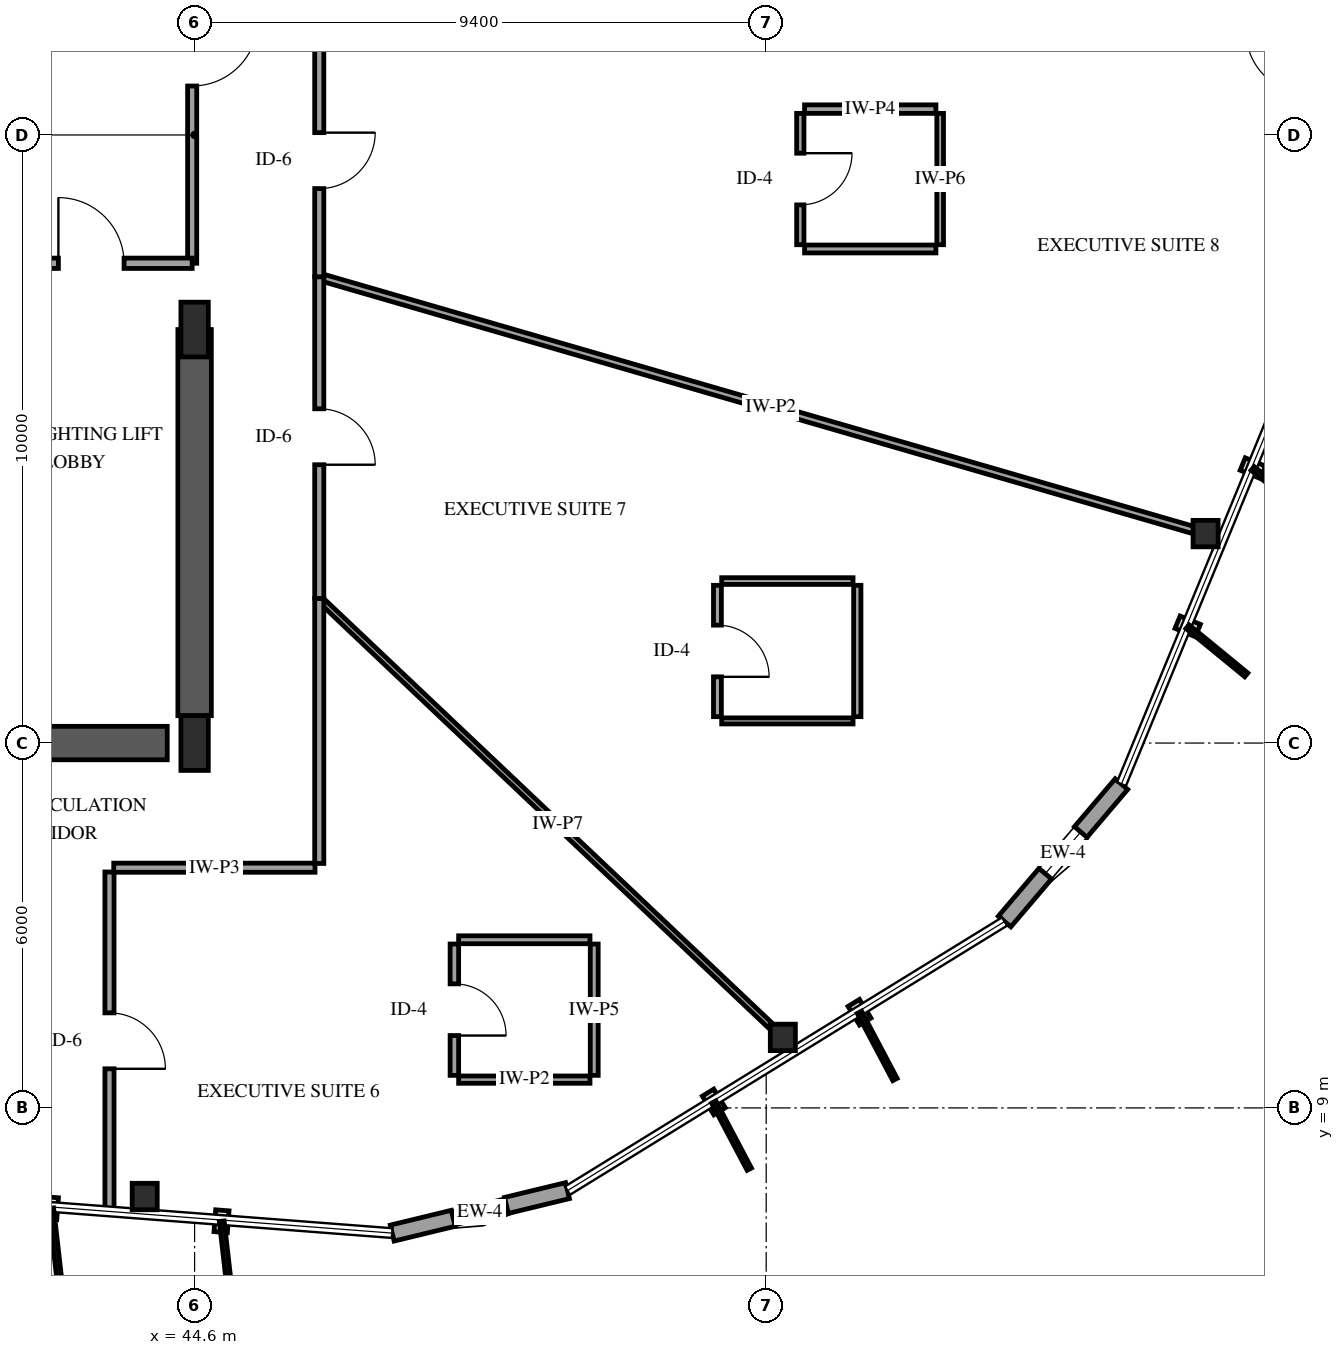
"""IFC4 building model, lengths in metres.
Left out: names, types, materials, properties, quantities, classifications, styles, units other than length and angle.
Written with IfcOpenShell. Run it as: python <this file> out.ifc"""

import sys

from ifc_helpers import new_model, si_unit, direction, frame, frame_2d, origin, origin_2d, place, context, subcontext, project, spatial, rectangle, i_section, extrude, element, fill, save


model = new_model("IFC4")
c1 = context("Model", 3, precision=1e-05, world=origin(), true_north=direction((0.0, 1.0)))
c2 = subcontext(c1, "Body", "Model", "MODEL_VIEW")
j1 = project(units=[si_unit("LENGTHUNIT", "METRE"), si_unit("PLANEANGLEUNIT", "RADIAN")], contexts=[c1])
p1 = place(None, origin())
s1 = spatial("IfcSite", under=j1, at=p1, CompositionType="ELEMENT")
p2 = place(p1, origin())
s2 = spatial("IfcBuilding", under=s1, at=p2, CompositionType="ELEMENT")
p3 = place(p2, frame((0.0, 0.0, 149.8)))
s3 = spatial("IfcBuildingStorey", under=s2, at=p3, CompositionType="ELEMENT", Elevation=149.8)
p4 = place(p3, frame((41.3, 15.0, 0.0), z_axis=(0.0, 0.0, 1.0), x_axis=(1.0, 0.0, 0.0)))
e1 = element("IfcWall", 1, at=p4, inside=s3, PredefinedType="SHEAR", context=c2, shape_type="SweptSolid", body=[
    extrude(rectangle(XDim=2.85, YDim=0.55, at=frame_2d((1.425, 0.0))), origin(), (0.0, 0.0, 1.0), 3.6),
])
p5 = place(p3, frame((44.6, 15.45, 0.0), z_axis=(0.0, 0.0, 1.0), x_axis=(0.0, 1.0, 0.0)))
e2 = element("IfcWall", 2, at=p5, inside=s3, PredefinedType="SHEAR", context=c2, shape_type="SweptSolid", body=[
    extrude(rectangle(XDim=6.35, YDim=0.55, at=frame_2d((3.175, 0.0))), origin(), (0.0, 0.0, 1.0), 3.6),
])
for number, where, z_axis, x_axis in (
    (3, (44.6, 15.0, 0.0), (0.0, 0.0, 1.0), (1.0, 0.0, 0.0)),
    (4, (44.6, 21.8, 0.0), (0.0, 0.0, 1.0), (1.0, 0.0, 0.0)),
):
    element("IfcColumn", number, at=place(p3, frame(where, z_axis=z_axis, x_axis=x_axis)), inside=s3, PredefinedType="PILASTER", context=c2, shape_type="SweptSolid", body=[
        extrude(rectangle(XDim=0.45, YDim=0.9, at=origin_2d()), origin(), (0.0, 0.0, 1.0), 3.6),
    ])
for number, where, z_axis, x_axis in (
    (5, (43.779, 7.542, 0.0), (0.0, 0.0, 1.0), (1.0, 0.0, 0.0)),
    (6, (54.274, 10.159, 0.0), (0.0, 0.0, 1.0), (1.0, 0.0, 0.0)),
    (7, (61.226, 18.444, 0.0), (0.0, 0.0, 1.0), (1.0, 0.0, 0.0)),
):
    element("IfcColumn", number, at=place(p3, frame(where, z_axis=z_axis, x_axis=x_axis)), inside=s3, PredefinedType="COLUMN", context=c2, shape_type="SweptSolid", body=[
        extrude(i_section(OverallWidth=0.412, OverallDepth=0.435, WebThickness=0.036, FlangeThickness=0.057, FilletRadius=0.038, at=origin_2d()), origin(), (0.0, 0.0, 1.0), 3.6),
    ])
p6 = place(p3, frame((47.849, 6.941, 0.0), z_axis=(0.0, 0.0, 1.0), x_axis=(0.971864950353, 0.235538782955, 0.0)))
e8 = element("IfcWall", 8, at=p6, inside=s3, PredefinedType="SOLIDWALL", context=c2, shape_type="SweptSolid", body=[
    extrude(rectangle(XDim=2.967, YDim=0.27, at=frame_2d((1.483, 0.0))), origin(), (0.0, 0.0, 1.0), 2.679),
])
p7 = place(p6, frame((1.033, 0.0, 0.75)))
e9 = element("IfcOpeningElement", 9, at=p7, cuts=e8, PredefinedType="OPENING", context=c2, shape_type="SweptSolid", body=[
    extrude(rectangle(XDim=0.9, YDim=1.5, at=frame_2d((0.45, 0.75))), frame((0.0, 0.145, 0.0), z_axis=(0.0, -1.0, 0.0), x_axis=(1.0, 0.0, 0.0)), (0.0, 0.0, 1.0), 0.29),
])
p8 = place(p3, frame((57.92, 12.065, 0.0), z_axis=(0.0, 0.0, 1.0), x_axis=(0.647858622498, 0.761760595762, 0.0)))
e10 = element("IfcWall", 10, at=p8, inside=s3, PredefinedType="SOLIDWALL", context=c2, shape_type="SweptSolid", body=[
    extrude(rectangle(XDim=2.967, YDim=0.27, at=frame_2d((1.483, 0.0))), origin(), (0.0, 0.0, 1.0), 2.679),
])
p9 = place(p8, frame((1.033, 0.0, 0.75)))
e11 = element("IfcOpeningElement", 11, at=p9, cuts=e10, PredefinedType="OPENING", context=c2, shape_type="SweptSolid", body=[
    extrude(rectangle(XDim=0.9, YDim=1.5, at=frame_2d((0.45, 0.75))), frame((0.0, 0.145, 0.0), z_axis=(0.0, -1.0, 0.0), x_axis=(1.0, 0.0, 0.0)), (0.0, 0.0, 1.0), 0.29),
])
p10 = place(p3, frame((63.282, 25.087, 0.0), z_axis=(0.0, 0.0, 1.0), x_axis=(-0.235484947951, 0.971877996092, 0.0)))
e12 = element("IfcWall", 12, at=p10, inside=s3, PredefinedType="SOLIDWALL", context=c2, shape_type="SweptSolid", body=[
    extrude(rectangle(XDim=8.44, YDim=0.25, at=frame_2d((4.22, 0.0))), origin(), (0.0, 0.0, 1.0), 2.679),
])
p11 = place(p10, frame((0.65, 0.0, 0.0)))
e13 = element("IfcOpeningElement", 13, at=p11, cuts=e12, PredefinedType="OPENING", context=c2, shape_type="SweptSolid", body=[
    extrude(rectangle(XDim=1.0, YDim=2.15, at=frame_2d((0.5, 1.075))), frame((0.0, 0.135, 0.0), z_axis=(0.0, -1.0, 0.0), x_axis=(1.0, 0.0, 0.0)), (0.0, 0.0, 1.0), 0.27),
])
p12 = place(p10, frame((2.29, 0.0, 0.72)))
e14 = element("IfcOpeningElement", 14, at=p12, cuts=e12, PredefinedType="OPENING", context=c2, shape_type="SweptSolid", body=[
    extrude(rectangle(XDim=1.35, YDim=1.65, at=frame_2d((0.675, 0.825))), frame((0.0, 0.135, 0.0), z_axis=(0.0, -1.0, 0.0), x_axis=(1.0, 0.0, 0.0)), (0.0, 0.0, 1.0), 0.27),
])
p13 = place(p3, frame((46.65, 22.668, 0.0), z_axis=(0.0, 0.0, 1.0), x_axis=(0.960498108687, -0.278286512804, 0.0)))
e15 = element("IfcWall", 15, at=p13, inside=s3, PredefinedType="PARTITIONING", context=c2, shape_type="SweptSolid", body=[
    extrude(rectangle(XDim=15.466, YDim=0.12, at=frame_2d((7.733, 0.0))), origin(), (0.0, 0.0, 1.0), 3.3),
])
p14 = place(p3, frame((46.65, 17.377, 0.0), z_axis=(0.0, 0.0, 1.0), x_axis=(0.726208125351, -0.687474914942, 0.0)))
e16 = element("IfcWall", 16, at=p14, inside=s3, PredefinedType="PARTITIONING", context=c2, shape_type="SweptSolid", body=[
    extrude(rectangle(XDim=10.797, YDim=0.1, at=frame_2d((5.399, 0.0))), origin(), (0.0, 0.0, 1.0), 2.595),
])
p15 = place(p3, frame((44.56, 29.8, 0.0), z_axis=(0.0, 0.0, 1.0), x_axis=(0.0, -1.0, 0.0)))
e17 = element("IfcWall", 17, at=p15, inside=s3, PredefinedType="PARTITIONING", context=c2, shape_type="SweptSolid", body=[
    extrude(rectangle(XDim=6.91, YDim=0.15, at=frame_2d((3.455, 0.0))), origin(), (0.0, 0.0, 1.0), 2.34),
])
p16 = place(p15, frame((2.915, 0.0, 0.0)))
e18 = element("IfcOpeningElement", 18, at=p16, cuts=e17, PredefinedType="OPENING", context=c2, shape_type="SweptSolid", body=[
    extrude(rectangle(XDim=1.08, YDim=2.15, at=frame_2d((0.54, 1.075))), frame((0.0, 0.085, 0.0), z_axis=(0.0, -1.0, 0.0), x_axis=(1.0, 0.0, 0.0)), (0.0, 0.0, 1.0), 0.17),
])
p17 = place(p3, frame((43.2, 12.88, 0.0), z_axis=(0.0, 0.0, 1.0), x_axis=(0.0, -1.0, 0.0)))
e19 = element("IfcWall", 19, at=p17, inside=s3, PredefinedType="PARTITIONING", context=c2, shape_type="SweptSolid", body=[
    extrude(rectangle(XDim=5.583, YDim=0.15, at=frame_2d((2.792, 0.0))), origin(), (0.0, 0.0, 1.0), 2.595),
])
p18 = place(p17, frame((2.317, 0.0, 0.0)))
e20 = element("IfcOpeningElement", 20, at=p18, cuts=e19, PredefinedType="OPENING", context=c2, shape_type="SweptSolid", body=[
    extrude(rectangle(XDim=0.92, YDim=2.12, at=frame_2d((0.46, 1.06))), frame((0.0, 0.085, 0.0), z_axis=(0.0, -1.0, 0.0), x_axis=(1.0, 0.0, 0.0)), (0.0, 0.0, 1.0), 0.17),
])
p19 = place(p3, frame((46.65, 22.668, 0.0), z_axis=(0.0, 0.0, 1.0), x_axis=(0.0, -1.0, 0.0)))
e21 = element("IfcWall", 21, at=p19, inside=s3, PredefinedType="PARTITIONING", context=c2, shape_type="SweptSolid", body=[
    extrude(rectangle(XDim=5.291, YDim=0.15, at=frame_2d((2.646, 0.0))), origin(), (0.0, 0.0, 1.0), 3.3),
])
p20 = place(p19, frame((2.171, 0.0, 0.0)))
e22 = element("IfcOpeningElement", 22, at=p20, cuts=e21, PredefinedType="OPENING", context=c2, shape_type="SweptSolid", body=[
    extrude(rectangle(XDim=0.92, YDim=2.12, at=frame_2d((0.46, 1.06))), frame((0.0, 0.085, 0.0), z_axis=(0.0, -1.0, 0.0), x_axis=(1.0, 0.0, 0.0)), (0.0, 0.0, 1.0), 0.17),
])
p21 = place(p3, frame((46.65, 17.377, 0.0), z_axis=(0.0, 0.0, 1.0), x_axis=(0.0, -1.0, 0.0)))
e23 = element("IfcWall", 23, at=p21, inside=s3, PredefinedType="PARTITIONING", context=c2, shape_type="SweptSolid", body=[
    extrude(rectangle(XDim=4.357, YDim=0.15, at=frame_2d((2.178, 0.0))), origin(), (0.0, 0.0, 1.0), 3.3),
])
p22 = place(p3, frame((46.65, 26.458, 0.0), z_axis=(0.0, 0.0, 1.0), x_axis=(0.0, -1.0, 0.0)))
e24 = element("IfcWall", 24, at=p22, inside=s3, PredefinedType="PARTITIONING", context=c2, shape_type="SweptSolid", body=[
    extrude(rectangle(XDim=3.79, YDim=0.15, at=frame_2d((1.895, 0.0))), origin(), (0.0, 0.0, 1.0), 3.3),
])
p23 = place(p22, frame((1.42, 0.0, 0.0)))
e25 = element("IfcOpeningElement", 25, at=p23, cuts=e24, PredefinedType="OPENING", context=c2, shape_type="SweptSolid", body=[
    extrude(rectangle(XDim=0.92, YDim=2.12, at=frame_2d((0.46, 1.06))), frame((0.0, 0.085, 0.0), z_axis=(0.0, -1.0, 0.0), x_axis=(1.0, 0.0, 0.0)), (0.0, 0.0, 1.0), 0.17),
])
p24 = place(p3, frame((41.24, 22.89, 0.0), z_axis=(0.0, 0.0, 1.0), x_axis=(1.0, 0.0, 0.0)))
e26 = element("IfcWall", 26, at=p24, inside=s3, PredefinedType="PARTITIONING", context=c2, shape_type="SweptSolid", body=[
    extrude(rectangle(XDim=3.32, YDim=0.17, at=frame_2d((1.66, 0.0))), origin(), (0.0, 0.0, 1.0), 3.3),
])
p25 = place(p24, frame((1.12, 0.0, 0.0)))
e27 = element("IfcOpeningElement", 27, at=p25, cuts=e26, PredefinedType="OPENING", context=c2, shape_type="SweptSolid", body=[
    extrude(rectangle(XDim=1.08, YDim=2.15, at=frame_2d((0.54, 1.075))), frame((0.0, 0.095, 0.0), z_axis=(0.0, -1.0, 0.0), x_axis=(1.0, 0.0, 0.0)), (0.0, 0.0, 1.0), 0.19),
])
p26 = place(p3, frame((46.58, 12.95, 0.0), z_axis=(0.0, 0.0, 1.0), x_axis=(-1.0, 0.0, 0.0)))
e28 = element("IfcWall", 28, at=p26, inside=s3, PredefinedType="PARTITIONING", context=c2, shape_type="SweptSolid", body=[
    extrude(rectangle(XDim=3.31, YDim=0.15, at=frame_2d((1.655, 0.0))), origin(), (0.0, 0.0, 1.0), 3.3),
])
p27 = place(p3, frame((53.198, 17.594, 0.0), z_axis=(0.0, 0.0, 1.0), x_axis=(0.0, -1.0, 0.0)))
e29 = element("IfcWall", 29, at=p27, inside=s3, PredefinedType="PARTITIONING", context=c2, shape_type="SweptSolid", body=[
    extrude(rectangle(XDim=2.16, YDim=0.13, at=frame_2d((1.08, 0.0))), origin(), (0.0, 0.0, 1.0), 3.3),
])
p28 = place(p27, frame((0.655, 0.0, 0.0)))
e30 = element("IfcOpeningElement", 30, at=p28, cuts=e29, PredefinedType="OPENING", context=c2, shape_type="SweptSolid", body=[
    extrude(rectangle(XDim=0.85, YDim=2.1, at=frame_2d((0.425, 1.05))), frame((0.0, 0.075, 0.0), z_axis=(0.0, -1.0, 0.0), x_axis=(1.0, 0.0, 0.0)), (0.0, 0.0, 1.0), 0.15),
])
p29 = place(p3, frame((55.498, 15.434, 0.0), z_axis=(0.0, 0.0, 1.0), x_axis=(0.0, 1.0, 0.0)))
e31 = element("IfcWall", 31, at=p29, inside=s3, PredefinedType="PARTITIONING", context=c2, shape_type="SweptSolid", body=[
    extrude(rectangle(XDim=2.16, YDim=0.12, at=frame_2d((1.08, 0.0))), origin(), (0.0, 0.0, 1.0), 3.3),
])
p30 = place(p3, frame((48.872, 11.695, 0.0), z_axis=(0.0, 0.0, 1.0), x_axis=(0.0, -1.0, 0.0)))
e32 = element("IfcWall", 32, at=p30, inside=s3, PredefinedType="PARTITIONING", context=c2, shape_type="SweptSolid", body=[
    extrude(rectangle(XDim=2.16, YDim=0.14, at=frame_2d((1.08, 0.0))), origin(), (0.0, 0.0, 1.0), 3.3),
])
p31 = place(p30, frame((0.655, 0.0, 0.0)))
e33 = element("IfcOpeningElement", 33, at=p31, cuts=e32, PredefinedType="OPENING", context=c2, shape_type="SweptSolid", body=[
    extrude(rectangle(XDim=0.85, YDim=2.1, at=frame_2d((0.425, 1.05))), frame((0.0, 0.08, 0.0), z_axis=(0.0, -1.0, 0.0), x_axis=(1.0, 0.0, 0.0)), (0.0, 0.0, 1.0), 0.16),
])
p32 = place(p3, frame((51.172, 9.535, 0.0), z_axis=(0.0, 0.0, 1.0), x_axis=(0.0, 1.0, 0.0)))
e34 = element("IfcWall", 34, at=p32, inside=s3, PredefinedType="PARTITIONING", context=c2, shape_type="SweptSolid", body=[
    extrude(rectangle(XDim=2.16, YDim=0.13, at=frame_2d((1.08, 0.0))), origin(), (0.0, 0.0, 1.0), 3.3),
])
p33 = place(p3, frame((54.561, 25.355, 0.0), z_axis=(0.0, 0.0, 1.0), x_axis=(0.0, -1.0, 0.0)))
e35 = element("IfcWall", 35, at=p33, inside=s3, PredefinedType="PARTITIONING", context=c2, shape_type="SweptSolid", body=[
    extrude(rectangle(XDim=2.16, YDim=0.12, at=frame_2d((1.08, 0.0))), origin(), (0.0, 0.0, 1.0), 3.3),
])
p34 = place(p33, frame((0.655, 0.0, 0.0)))
e36 = element("IfcOpeningElement", 36, at=p34, cuts=e35, PredefinedType="OPENING", context=c2, shape_type="SweptSolid", body=[
    extrude(rectangle(XDim=0.85, YDim=2.1, at=frame_2d((0.425, 1.05))), frame((0.0, 0.07, 0.0), z_axis=(0.0, -1.0, 0.0), x_axis=(1.0, 0.0, 0.0)), (0.0, 0.0, 1.0), 0.14),
])
p35 = place(p3, frame((56.861, 23.195, 0.0), z_axis=(0.0, 0.0, 1.0), x_axis=(0.0, 1.0, 0.0)))
e37 = element("IfcWall", 37, at=p35, inside=s3, PredefinedType="PARTITIONING", context=c2, shape_type="SweptSolid", body=[
    extrude(rectangle(XDim=2.16, YDim=0.11, at=frame_2d((1.08, 0.0))), origin(), (0.0, 0.0, 1.0), 3.3),
])
p36 = place(p3, frame((51.102, 11.765, 0.0), z_axis=(0.0, 0.0, 1.0), x_axis=(-1.0, 0.0, 0.0)))
e38 = element("IfcWall", 38, at=p36, inside=s3, PredefinedType="PARTITIONING", context=c2, shape_type="SweptSolid", body=[
    extrude(rectangle(XDim=2.16, YDim=0.13, at=frame_2d((1.08, 0.0))), origin(), (0.0, 0.0, 1.0), 3.3),
])
p37 = place(p3, frame((48.942, 9.465, 0.0), z_axis=(0.0, 0.0, 1.0), x_axis=(1.0, 0.0, 0.0)))
e39 = element("IfcWall", 39, at=p37, inside=s3, PredefinedType="PARTITIONING", context=c2, shape_type="SweptSolid", body=[
    extrude(rectangle(XDim=2.16, YDim=0.12, at=frame_2d((1.08, 0.0))), origin(), (0.0, 0.0, 1.0), 2.511),
])
p38 = place(p3, frame((55.428, 17.664, 0.0), z_axis=(0.0, 0.0, 1.0), x_axis=(-1.0, 0.0, 0.0)))
e40 = element("IfcWall", 40, at=p38, inside=s3, PredefinedType="PARTITIONING", context=c2, shape_type="SweptSolid", body=[
    extrude(rectangle(XDim=2.16, YDim=0.11, at=frame_2d((1.08, 0.0))), origin(), (0.0, 0.0, 1.0), 3.3),
])
p39 = place(p3, frame((53.268, 15.364, 0.0), z_axis=(0.0, 0.0, 1.0), x_axis=(1.0, 0.0, 0.0)))
e41 = element("IfcWall", 41, at=p39, inside=s3, PredefinedType="PARTITIONING", context=c2, shape_type="SweptSolid", body=[
    extrude(rectangle(XDim=2.16, YDim=0.1, at=frame_2d((1.08, 0.0))), origin(), (0.0, 0.0, 1.0), 3.3),
])
p40 = place(p3, frame((56.791, 25.425, 0.0), z_axis=(0.0, 0.0, 1.0), x_axis=(-1.0, 0.0, 0.0)))
e42 = element("IfcWall", 42, at=p40, inside=s3, PredefinedType="PARTITIONING", context=c2, shape_type="SweptSolid", body=[
    extrude(rectangle(XDim=2.16, YDim=0.14, at=frame_2d((1.08, 0.0))), origin(), (0.0, 0.0, 1.0), 3.3),
])
p41 = place(p3, frame((54.631, 23.125, 0.0), z_axis=(0.0, 0.0, 1.0), x_axis=(1.0, 0.0, 0.0)))
e43 = element("IfcWall", 43, at=p41, inside=s3, PredefinedType="PARTITIONING", context=c2, shape_type="SweptSolid", body=[
    extrude(rectangle(XDim=2.16, YDim=0.13, at=frame_2d((1.08, 0.0))), origin(), (0.0, 0.0, 1.0), 3.3),
])
p42 = place(p7, origin())
e44 = element("IfcWindow", 44, at=p42, inside=s3, PartitioningType="SINGLE_PANEL", PredefinedType="WINDOW", context=c2, shape_type="SweptSolid", body=[
    extrude(rectangle(XDim=0.9, YDim=1.5, at=frame_2d((0.45, 0.75))), frame((0.0, 0.03, 0.0), z_axis=(0.0, -1.0, 0.0), x_axis=(1.0, 0.0, 0.0)), (0.0, 0.0, 1.0), 0.06),
])
fill(e9, e44)
p43 = place(p9, origin())
e45 = element("IfcWindow", 45, at=p43, inside=s3, PartitioningType="SINGLE_PANEL", PredefinedType="WINDOW", context=c2, shape_type="SweptSolid", body=[
    extrude(rectangle(XDim=0.9, YDim=1.5, at=frame_2d((0.45, 0.75))), frame((0.0, 0.03, 0.0), z_axis=(0.0, -1.0, 0.0), x_axis=(1.0, 0.0, 0.0)), (0.0, 0.0, 1.0), 0.06),
])
fill(e11, e45)
p44 = place(p16, origin())
e46 = element("IfcDoor", 46, at=p44, inside=s3, OperationType="SINGLE_SWING_LEFT", PredefinedType="DOOR", context=c2, shape_type="SweptSolid", body=[
    extrude(rectangle(XDim=1.08, YDim=2.15, at=frame_2d((0.54, 1.075))), frame((0.0, 0.025, 0.0), z_axis=(0.0, -1.0, 0.0), x_axis=(1.0, 0.0, 0.0)), (0.0, 0.0, 1.0), 0.05),
])
fill(e18, e46)
p45 = place(p18, origin())
e47 = element("IfcDoor", 47, at=p45, inside=s3, OperationType="SINGLE_SWING_RIGHT", PredefinedType="DOOR", context=c2, shape_type="SweptSolid", body=[
    extrude(rectangle(XDim=0.92, YDim=2.12, at=frame_2d((0.46, 1.06))), frame((0.0, 0.025, 0.0), z_axis=(0.0, -1.0, 0.0), x_axis=(1.0, 0.0, 0.0)), (0.0, 0.0, 1.0), 0.05),
])
fill(e20, e47)
p46 = place(p20, origin())
e48 = element("IfcDoor", 48, at=p46, inside=s3, OperationType="SINGLE_SWING_RIGHT", PredefinedType="DOOR", context=c2, shape_type="SweptSolid", body=[
    extrude(rectangle(XDim=0.92, YDim=2.12, at=frame_2d((0.46, 1.06))), frame((0.0, 0.025, 0.0), z_axis=(0.0, -1.0, 0.0), x_axis=(1.0, 0.0, 0.0)), (0.0, 0.0, 1.0), 0.05),
])
fill(e22, e48)
p47 = place(p23, origin())
e49 = element("IfcDoor", 49, at=p47, inside=s3, OperationType="SINGLE_SWING_LEFT", PredefinedType="DOOR", context=c2, shape_type="SweptSolid", body=[
    extrude(rectangle(XDim=0.92, YDim=2.12, at=frame_2d((0.46, 1.06))), frame((0.0, 0.025, 0.0), z_axis=(0.0, -1.0, 0.0), x_axis=(1.0, 0.0, 0.0)), (0.0, 0.0, 1.0), 0.05),
])
fill(e25, e49)
p48 = place(p25, origin())
e50 = element("IfcDoor", 50, at=p48, inside=s3, OperationType="SINGLE_SWING_LEFT", PredefinedType="DOOR", context=c2, shape_type="SweptSolid", body=[
    extrude(rectangle(XDim=1.08, YDim=2.15, at=frame_2d((0.54, 1.075))), frame((0.0, 0.025, 0.0), z_axis=(0.0, -1.0, 0.0), x_axis=(1.0, 0.0, 0.0)), (0.0, 0.0, 1.0), 0.05),
])
fill(e27, e50)
p49 = place(p28, origin())
e51 = element("IfcDoor", 51, at=p49, inside=s3, OperationType="SINGLE_SWING_RIGHT", PredefinedType="DOOR", context=c2, shape_type="SweptSolid", body=[
    extrude(rectangle(XDim=0.85, YDim=2.1, at=frame_2d((0.425, 1.05))), frame((0.0, 0.025, 0.0), z_axis=(0.0, -1.0, 0.0), x_axis=(1.0, 0.0, 0.0)), (0.0, 0.0, 1.0), 0.05),
])
fill(e30, e51)
p50 = place(p31, origin())
e52 = element("IfcDoor", 52, at=p50, inside=s3, OperationType="SINGLE_SWING_RIGHT", PredefinedType="DOOR", context=c2, shape_type="SweptSolid", body=[
    extrude(rectangle(XDim=0.85, YDim=2.1, at=frame_2d((0.425, 1.05))), frame((0.0, 0.025, 0.0), z_axis=(0.0, -1.0, 0.0), x_axis=(1.0, 0.0, 0.0)), (0.0, 0.0, 1.0), 0.05),
])
fill(e33, e52)
p51 = place(p34, origin())
e53 = element("IfcDoor", 53, at=p51, inside=s3, OperationType="SINGLE_SWING_LEFT", PredefinedType="DOOR", context=c2, shape_type="SweptSolid", body=[
    extrude(rectangle(XDim=0.85, YDim=2.1, at=frame_2d((0.425, 1.05))), frame((0.0, 0.025, 0.0), z_axis=(0.0, -1.0, 0.0), x_axis=(1.0, 0.0, 0.0)), (0.0, 0.0, 1.0), 0.05),
])
fill(e36, e53)
save(model, sys.argv[1])
